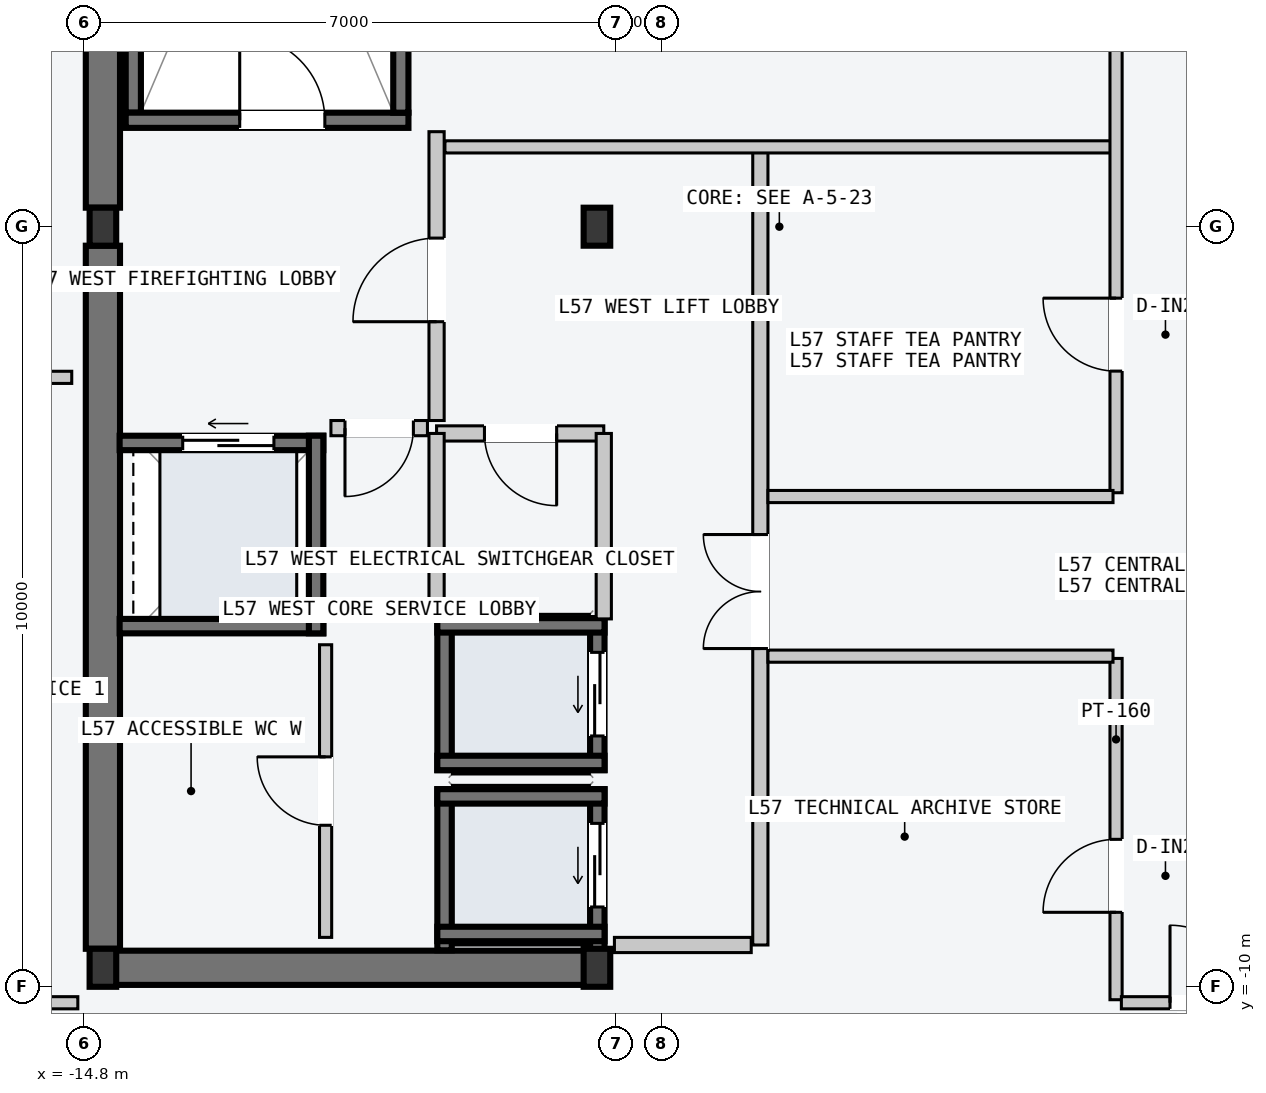
"""IFC4 building model, lengths in metres.
Left out: names, types, materials, properties, quantities, classifications, styles, units other than length and angle.
Written with IfcOpenShell. Run it as: python <this file> out.ifc"""

import sys

from ifc_helpers import new_model, si_unit, direction, frame, frame_2d, origin, origin_2d, place, context, subcontext, project, spatial, rectangle, i_section, extrude, element, fill, save


model = new_model("IFC4")
c1 = context("Model", 3, precision=1e-05, world=origin(), true_north=direction((0.0, 1.0)))
c2 = subcontext(c1, "Body", "Model", "MODEL_VIEW")
j1 = project(units=[si_unit("LENGTHUNIT", "METRE"), si_unit("PLANEANGLEUNIT", "RADIAN")], contexts=[c1])
p1 = place(None, origin())
s1 = spatial("IfcSite", under=j1, at=p1, CompositionType="ELEMENT")
p2 = place(p1, origin())
s2 = spatial("IfcBuilding", under=s1, at=p2, CompositionType="ELEMENT")
p3 = place(p2, frame((0.0, 0.0, 218.4)))
s3 = spatial("IfcBuildingStorey", under=s2, at=p3, CompositionType="ELEMENT", Elevation=218.4)
p4 = place(p3, frame((-14.53, -9.75, -0.2), z_axis=(0.0, 0.0, 1.0), x_axis=(1.0, 0.0, 0.0)))
e1 = element("IfcWall", 1, at=p4, inside=s3, PredefinedType="SHEAR", context=c2, shape_type="SweptSolid", body=[
    extrude(rectangle(XDim=6.46, YDim=0.45, at=frame_2d((3.23, 0.0))), origin(), (0.0, 0.0, 1.0), 3.6),
])
for number, where, z_axis, x_axis in (
    (2, (-14.55, -9.5, -0.2), (0.0, 0.0, 1.0), (0.0, 1.0, 0.0)),
    (3, (-14.55, 0.25, -0.2), (0.0, 0.0, 1.0), (0.0, 1.0, 0.0)),
):
    element("IfcWall", number, at=place(p3, frame(where, z_axis=z_axis, x_axis=x_axis)), inside=s3, PredefinedType="SHEAR", context=c2, shape_type="SweptSolid", body=[
        extrude(rectangle(XDim=9.25, YDim=0.45, at=frame_2d((4.625, 0.0))), origin(), (0.0, 0.0, 1.0), 3.6),
    ])
p5 = place(p3, frame((-14.15, 1.5, -0.2), z_axis=(0.0, 0.0, 1.0), x_axis=(0.0, 1.0, 0.0)))
e4 = element("IfcWall", 4, at=p5, inside=s3, PredefinedType="SOLIDWALL", context=c2, shape_type="SweptSolid", body=[
    extrude(rectangle(XDim=7.8, YDim=0.2, at=frame_2d((3.9, 0.0))), origin(), (0.0, 0.0, 1.0), 3.6),
])
p6 = place(p3, frame((-14.25, 1.4, -0.2), z_axis=(0.0, 0.0, 1.0), x_axis=(1.0, 0.0, 0.0)))
e5 = element("IfcWall", 5, at=p6, inside=s3, PredefinedType="SOLIDWALL", context=c2, shape_type="SweptSolid", body=[
    extrude(rectangle(XDim=3.72, YDim=0.2, at=frame_2d((1.86, 0.0))), origin(), (0.0, 0.0, 1.0), 3.6),
])
p7 = place(p6, frame((1.5, 0.0, 0.2)))
e6 = element("IfcOpeningElement", 6, at=p7, cuts=e5, PredefinedType="OPENING", context=c2, shape_type="SweptSolid", body=[
    extrude(rectangle(XDim=1.12, YDim=2.18, at=frame_2d((0.56, 1.09))), frame((0.0, 0.11, 0.0), z_axis=(0.0, -1.0, 0.0), x_axis=(1.0, 0.0, 0.0)), (0.0, 0.0, 1.0), 0.22),
])
p8 = place(p3, frame((-10.63, 1.5, -0.2), z_axis=(0.0, 0.0, 1.0), x_axis=(0.0, 1.0, 0.0)))
e7 = element("IfcWall", 7, at=p8, inside=s3, PredefinedType="SOLIDWALL", context=c2, shape_type="SweptSolid", body=[
    extrude(rectangle(XDim=7.8, YDim=0.2, at=frame_2d((3.9, 0.0))), origin(), (0.0, 0.0, 1.0), 3.6),
])
for number, where, z_axis, x_axis in (
    (8, (-14.55, -9.75, 0.0), (0.0, 0.0, 1.0), (1.0, 0.0, 0.0)),
    (9, (-14.55, 0.0, 0.0), (0.0, 0.0, 1.0), (1.0, 0.0, 0.0)),
    (10, (-8.05, -9.75, 0.0), (0.0, 0.0, 1.0), (1.0, 0.0, 0.0)),
    (11, (-8.05, 0.0, 0.0), (0.0, 0.0, 1.0), (1.0, 0.0, 0.0)),
):
    element("IfcColumn", number, at=place(p3, frame(where, z_axis=z_axis, x_axis=x_axis)), inside=s3, PredefinedType="COLUMN", context=c2, shape_type="SweptSolid", body=[
        extrude(i_section(OverallWidth=0.35, OverallDepth=0.5, WebThickness=0.02, FlangeThickness=0.032, at=origin_2d()), origin(), (0.0, 0.0, 1.0), 3.6),
    ])
p9 = place(p3, frame((-8.045, -9.52, -0.2), z_axis=(0.0, 0.0, 1.0), x_axis=(0.0, 1.0, 0.0)))
e12 = element("IfcWall", 12, at=p9, inside=s3, PredefinedType="SOLIDWALL", context=c2, shape_type="SweptSolid", body=[
    extrude(rectangle(XDim=2.12, YDim=0.19, at=frame_2d((1.06, 0.0))), origin(), (0.0, 0.0, 1.0), 3.6),
])
p10 = place(p9, frame((0.57, 0.0, 0.2)))
e13 = element("IfcOpeningElement", 13, at=p10, cuts=e12, PredefinedType="OPENING", context=c2, shape_type="SweptSolid", body=[
    extrude(rectangle(XDim=1.1, YDim=2.2, at=frame_2d((0.55, 1.1))), frame((0.0, 0.105, 0.0), z_axis=(0.0, -1.0, 0.0), x_axis=(1.0, 0.0, 0.0)), (0.0, 0.0, 1.0), 0.21),
])
p11 = place(p3, frame((-10.055, -9.52, -0.2), z_axis=(0.0, 0.0, 1.0), x_axis=(0.0, 1.0, 0.0)))
e14 = element("IfcWall", 14, at=p11, inside=s3, PredefinedType="SOLIDWALL", context=c2, shape_type="SweptSolid", body=[
    extrude(rectangle(XDim=2.12, YDim=0.19, at=frame_2d((1.06, 0.0))), origin(), (0.0, 0.0, 1.0), 3.6),
])
for number, where, z_axis, x_axis in (
    (15, (-10.15, -7.495, -0.2), (0.0, 0.0, 1.0), (1.0, 0.0, 0.0)),
    (16, (-10.15, -9.305, -0.2), (0.0, 0.0, 1.0), (1.0, 0.0, 0.0)),
):
    element("IfcWall", number, at=place(p3, frame(where, z_axis=z_axis, x_axis=x_axis)), inside=s3, PredefinedType="SOLIDWALL", context=c2, shape_type="SweptSolid", body=[
        extrude(rectangle(XDim=2.2, YDim=0.19, at=frame_2d((1.1, 0.0))), origin(), (0.0, 0.0, 1.0), 3.6),
    ])
p12 = place(p3, frame((-8.045, -7.15, -0.2), z_axis=(0.0, 0.0, 1.0), x_axis=(0.0, 1.0, 0.0)))
e17 = element("IfcWall", 17, at=p12, inside=s3, PredefinedType="SOLIDWALL", context=c2, shape_type="SweptSolid", body=[
    extrude(rectangle(XDim=2.0, YDim=0.19, at=frame_2d((1.0, 0.0))), origin(), (0.0, 0.0, 1.0), 3.6),
])
p13 = place(p12, frame((0.45, 0.0, 0.2)))
e18 = element("IfcOpeningElement", 18, at=p13, cuts=e17, PredefinedType="OPENING", context=c2, shape_type="SweptSolid", body=[
    extrude(rectangle(XDim=1.1, YDim=2.2, at=frame_2d((0.55, 1.1))), frame((0.0, 0.105, 0.0), z_axis=(0.0, -1.0, 0.0), x_axis=(1.0, 0.0, 0.0)), (0.0, 0.0, 1.0), 0.21),
])
p14 = place(p3, frame((-10.055, -7.15, -0.2), z_axis=(0.0, 0.0, 1.0), x_axis=(0.0, 1.0, 0.0)))
e19 = element("IfcWall", 19, at=p14, inside=s3, PredefinedType="SOLIDWALL", context=c2, shape_type="SweptSolid", body=[
    extrude(rectangle(XDim=2.0, YDim=0.19, at=frame_2d((1.0, 0.0))), origin(), (0.0, 0.0, 1.0), 3.6),
])
for number, where, z_axis, x_axis in (
    (20, (-10.15, -5.245, -0.2), (0.0, 0.0, 1.0), (1.0, 0.0, 0.0)),
    (21, (-10.15, -7.055, -0.2), (0.0, 0.0, 1.0), (1.0, 0.0, 0.0)),
):
    element("IfcWall", number, at=place(p3, frame(where, z_axis=z_axis, x_axis=x_axis)), inside=s3, PredefinedType="SOLIDWALL", context=c2, shape_type="SweptSolid", body=[
        extrude(rectangle(XDim=2.2, YDim=0.19, at=frame_2d((1.1, 0.0))), origin(), (0.0, 0.0, 1.0), 3.6),
    ])
p15 = place(p3, frame((-14.33, -2.845, -0.2), z_axis=(0.0, 0.0, 1.0), x_axis=(1.0, 0.0, 0.0)))
e22 = element("IfcWall", 22, at=p15, inside=s3, PredefinedType="SOLIDWALL", context=c2, shape_type="SweptSolid", body=[
    extrude(rectangle(XDim=2.68, YDim=0.19, at=frame_2d((1.34, 0.0))), origin(), (0.0, 0.0, 1.0), 3.6),
])
p16 = place(p15, frame((0.83, 0.0, 0.2)))
e23 = element("IfcOpeningElement", 23, at=p16, cuts=e22, PredefinedType="OPENING", context=c2, shape_type="SweptSolid", body=[
    extrude(rectangle(XDim=1.2, YDim=2.2, at=frame_2d((0.6, 1.1))), frame((0.0, 0.105, 0.0), z_axis=(0.0, -1.0, 0.0), x_axis=(1.0, 0.0, 0.0)), (0.0, 0.0, 1.0), 0.21),
])
p17 = place(p3, frame((-14.33, -5.255, -0.2), z_axis=(0.0, 0.0, 1.0), x_axis=(1.0, 0.0, 0.0)))
e24 = element("IfcWall", 24, at=p17, inside=s3, PredefinedType="SOLIDWALL", context=c2, shape_type="SweptSolid", body=[
    extrude(rectangle(XDim=2.68, YDim=0.19, at=frame_2d((1.34, 0.0))), origin(), (0.0, 0.0, 1.0), 3.6),
])
p18 = place(p3, frame((-11.745, -5.35, -0.2), z_axis=(0.0, 0.0, 1.0), x_axis=(0.0, 1.0, 0.0)))
e25 = element("IfcWall", 25, at=p18, inside=s3, PredefinedType="SOLIDWALL", context=c2, shape_type="SweptSolid", body=[
    extrude(rectangle(XDim=2.6, YDim=0.19, at=frame_2d((1.3, 0.0))), origin(), (0.0, 0.0, 1.0), 3.6),
])
p19 = place(p3, frame((-5.9, -9.45, 0.0), z_axis=(0.0, 0.0, 1.0), x_axis=(0.0, 1.0, 0.0)))
e26 = element("IfcWall", 26, at=p19, inside=s3, PredefinedType="PARTITIONING", context=c2, shape_type="SweptSolid", body=[
    extrude(rectangle(XDim=10.5, YDim=0.2, at=frame_2d((5.25, 0.0))), origin(), (0.0, 0.0, 1.0), 3.4),
])
p20 = place(p19, frame((3.9, 0.0, 0.0)))
e27 = element("IfcOpeningElement", 27, at=p20, cuts=e26, PredefinedType="OPENING", context=c2, shape_type="SweptSolid", body=[
    extrude(rectangle(XDim=1.5, YDim=2.2, at=frame_2d((0.75, 1.1))), frame((0.0, 0.11, 0.0), z_axis=(0.0, -1.0, 0.0), x_axis=(1.0, 0.0, 0.0)), (0.0, 0.0, 1.0), 0.22),
])
p21 = place(p3, frame((-6.02, -9.45, 0.0), z_axis=(0.0, 0.0, 1.0), x_axis=(-1.0, 0.0, 0.0)))
e28 = element("IfcWall", 28, at=p21, inside=s3, PredefinedType="PARTITIONING", context=c2, shape_type="SweptSolid", body=[
    extrude(rectangle(XDim=1.8, YDim=0.2, at=frame_2d((0.9, 0.0))), origin(), (0.0, 0.0, 1.0), 3.4),
])
p22 = place(p3, frame((-10.16, -2.55, 0.0), z_axis=(0.0, 0.0, 1.0), x_axis=(0.0, 1.0, 0.0)))
e29 = element("IfcWall", 29, at=p22, inside=s3, PredefinedType="PARTITIONING", context=c2, shape_type="SweptSolid", body=[
    extrude(rectangle(XDim=3.8, YDim=0.2, at=frame_2d((1.9, 0.0))), origin(), (0.0, 0.0, 1.0), 3.4),
])
p23 = place(p22, frame((1.3, 0.0, 0.0)))
e30 = element("IfcOpeningElement", 30, at=p23, cuts=e29, PredefinedType="OPENING", context=c2, shape_type="SweptSolid", body=[
    extrude(rectangle(XDim=1.1, YDim=2.15, at=frame_2d((0.55, 1.075))), frame((0.0, 0.11, 0.0), z_axis=(0.0, -1.0, 0.0), x_axis=(1.0, 0.0, 0.0)), (0.0, 0.0, 1.0), 0.22),
])
p24 = place(p3, frame((-10.28, -2.65, 0.0), z_axis=(0.0, 0.0, 1.0), x_axis=(-1.0, 0.0, 0.0)))
e31 = element("IfcWall", 31, at=p24, inside=s3, PredefinedType="PARTITIONING", context=c2, shape_type="SweptSolid", body=[
    extrude(rectangle(XDim=1.27, YDim=0.2, at=frame_2d((0.635, 0.0))), origin(), (0.0, 0.0, 1.0), 3.4),
])
p25 = place(p24, frame((0.185, 0.0, 0.0)))
e32 = element("IfcOpeningElement", 32, at=p25, cuts=e31, PredefinedType="OPENING", context=c2, shape_type="SweptSolid", body=[
    extrude(rectangle(XDim=0.9, YDim=2.15, at=frame_2d((0.45, 1.075))), frame((0.0, 0.11, 0.0), z_axis=(0.0, -1.0, 0.0), x_axis=(1.0, 0.0, 0.0)), (0.0, 0.0, 1.0), 0.22),
])
p26 = place(p3, frame((-7.96, -2.72, 0.0), z_axis=(0.0, 0.0, 1.0), x_axis=(-1.0, 0.0, 0.0)))
e33 = element("IfcWall", 33, at=p26, inside=s3, PredefinedType="PARTITIONING", context=c2, shape_type="SweptSolid", body=[
    extrude(rectangle(XDim=2.2, YDim=0.2, at=frame_2d((1.1, 0.0))), origin(), (0.0, 0.0, 1.0), 3.4),
])
p27 = place(p26, frame((0.62, 0.0, 0.0)))
e34 = element("IfcOpeningElement", 34, at=p27, cuts=e33, PredefinedType="OPENING", context=c2, shape_type="SweptSolid", body=[
    extrude(rectangle(XDim=0.95, YDim=2.1, at=frame_2d((0.475, 1.05))), frame((0.0, 0.11, 0.0), z_axis=(0.0, -1.0, 0.0), x_axis=(1.0, 0.0, 0.0)), (0.0, 0.0, 1.0), 0.22),
])
for number, where, z_axis, x_axis in (
    (35, (-7.96, -5.16, 0.0), (0.0, 0.0, 1.0), (0.0, 1.0, 0.0)),
    (36, (-10.16, -5.16, 0.0), (0.0, 0.0, 1.0), (0.0, 1.0, 0.0)),
):
    element("IfcWall", number, at=place(p3, frame(where, z_axis=z_axis, x_axis=x_axis)), inside=s3, PredefinedType="PARTITIONING", context=c2, shape_type="SweptSolid", body=[
        extrude(rectangle(XDim=2.44, YDim=0.2, at=frame_2d((1.22, 0.0))), origin(), (0.0, 0.0, 1.0), 3.4),
    ])
p28 = place(p3, frame((-11.62, -9.35, 0.0), z_axis=(0.0, 0.0, 1.0), x_axis=(0.0, 1.0, 0.0)))
e37 = element("IfcWall", 37, at=p28, inside=s3, PredefinedType="PARTITIONING", context=c2, shape_type="SweptSolid", body=[
    extrude(rectangle(XDim=3.85, YDim=0.16, at=frame_2d((1.925, 0.0))), origin(), (0.0, 0.0, 1.0), 3.4),
])
p29 = place(p28, frame((1.475, 0.0, 0.0)))
e38 = element("IfcOpeningElement", 38, at=p29, cuts=e37, PredefinedType="OPENING", context=c2, shape_type="SweptSolid", body=[
    extrude(rectangle(XDim=0.9, YDim=2.15, at=frame_2d((0.45, 1.075))), frame((0.0, 0.09, 0.0), z_axis=(0.0, -1.0, 0.0), x_axis=(1.0, 0.0, 0.0)), (0.0, 0.0, 1.0), 0.18),
])
p30 = place(p3, frame((-10.05, 1.05, 0.0), z_axis=(0.0, 0.0, 1.0), x_axis=(1.0, 0.0, 0.0)))
e39 = element("IfcWall", 39, at=p30, inside=s3, PredefinedType="PARTITIONING", context=c2, shape_type="SweptSolid", body=[
    extrude(rectangle(XDim=8.79, YDim=0.16, at=frame_2d((4.395, 0.0))), origin(), (0.0, 0.0, 1.0), 3.4),
])
p31 = place(p3, frame((-1.22, -3.5, 0.0), z_axis=(0.0, 0.0, 1.0), x_axis=(0.0, 1.0, 0.0)))
e40 = element("IfcWall", 40, at=p31, inside=s3, PredefinedType="PARTITIONING", context=c2, shape_type="SweptSolid", body=[
    extrude(rectangle(XDim=12.81, YDim=0.16, at=frame_2d((6.405, 0.0))), origin(), (0.0, 0.0, 1.0), 3.4),
])
p32 = place(p31, frame((6.1, 0.0, 0.0)))
e41 = element("IfcOpeningElement", 41, at=p32, cuts=e40, PredefinedType="OPENING", context=c2, shape_type="SweptSolid", body=[
    extrude(rectangle(XDim=1.24, YDim=2.24, at=frame_2d((0.62, 1.12))), frame((0.0, 0.09, 0.0), z_axis=(0.0, -1.0, 0.0), x_axis=(1.0, 0.0, 0.0)), (0.0, 0.0, 1.0), 0.18),
])
p33 = place(p31, frame((1.6, 0.0, 0.0)))
e42 = element("IfcOpeningElement", 42, at=p33, cuts=e40, PredefinedType="OPENING", context=c2, shape_type="SweptSolid", body=[
    extrude(rectangle(XDim=0.96, YDim=2.18, at=frame_2d((0.48, 1.09))), frame((0.0, 0.09, 0.0), z_axis=(0.0, -1.0, 0.0), x_axis=(1.0, 0.0, 0.0)), (0.0, 0.0, 1.0), 0.18),
])
p34 = place(p3, frame((-5.8, -3.55, 0.0), z_axis=(0.0, 0.0, 1.0), x_axis=(1.0, 0.0, 0.0)))
e43 = element("IfcWall", 43, at=p34, inside=s3, PredefinedType="PARTITIONING", context=c2, shape_type="SweptSolid", body=[
    extrude(rectangle(XDim=4.54, YDim=0.16, at=frame_2d((2.27, 0.0))), origin(), (0.0, 0.0, 1.0), 3.4),
])
p35 = place(p3, frame((-1.22, -10.17, 0.0), z_axis=(0.0, 0.0, 1.0), x_axis=(0.0, 1.0, 0.0)))
e44 = element("IfcWall", 44, at=p35, inside=s3, PredefinedType="PARTITIONING", context=c2, shape_type="SweptSolid", body=[
    extrude(rectangle(XDim=4.49, YDim=0.16, at=frame_2d((2.245, 0.0))), origin(), (0.0, 0.0, 1.0), 3.4),
])
p36 = place(p35, frame((1.15, 0.0, 0.0)))
e45 = element("IfcOpeningElement", 45, at=p36, cuts=e44, PredefinedType="OPENING", context=c2, shape_type="SweptSolid", body=[
    extrude(rectangle(XDim=0.96, YDim=2.18, at=frame_2d((0.48, 1.09))), frame((0.0, 0.09, 0.0), z_axis=(0.0, -1.0, 0.0), x_axis=(1.0, 0.0, 0.0)), (0.0, 0.0, 1.0), 0.18),
])
p37 = place(p3, frame((-5.8, -5.65, 0.0), z_axis=(0.0, 0.0, 1.0), x_axis=(1.0, 0.0, 0.0)))
e46 = element("IfcWall", 46, at=p37, inside=s3, PredefinedType="PARTITIONING", context=c2, shape_type="SweptSolid", body=[
    extrude(rectangle(XDim=4.54, YDim=0.16, at=frame_2d((2.27, 0.0))), origin(), (0.0, 0.0, 1.0), 3.4),
])
p38 = place(p3, frame((-1.15, -10.21, 0.0), z_axis=(0.0, 0.0, 1.0), x_axis=(1.0, 0.0, 0.0)))
e47 = element("IfcWall", 47, at=p38, inside=s3, PredefinedType="PARTITIONING", context=c2, shape_type="SweptSolid", body=[
    extrude(rectangle(XDim=2.3, YDim=0.16, at=frame_2d((1.15, 0.0))), origin(), (0.0, 0.0, 1.0), 3.4),
])
p39 = place(p38, frame((0.64, 0.0, 0.0)))
e48 = element("IfcOpeningElement", 48, at=p39, cuts=e47, PredefinedType="OPENING", context=c2, shape_type="SweptSolid", body=[
    extrude(rectangle(XDim=1.02, YDim=2.2, at=frame_2d((0.51, 1.1))), frame((0.0, 0.09, 0.0), z_axis=(0.0, -1.0, 0.0), x_axis=(1.0, 0.0, 0.0)), (0.0, 0.0, 1.0), 0.18),
])
p40 = place(p3, frame((-18.56, -10.21, 0.0), z_axis=(0.0, 0.0, 1.0), x_axis=(1.0, 0.0, 0.0)))
e49 = element("IfcWall", 49, at=p40, inside=s3, PredefinedType="PARTITIONING", context=c2, shape_type="SweptSolid", body=[
    extrude(rectangle(XDim=3.68, YDim=0.16, at=frame_2d((1.84, 0.0))), origin(), (0.0, 0.0, 1.0), 3.4),
])
p41 = place(p40, frame((1.36, 0.0, 0.0)))
e50 = element("IfcOpeningElement", 50, at=p41, cuts=e49, PredefinedType="OPENING", context=c2, shape_type="SweptSolid", body=[
    extrude(rectangle(XDim=0.96, YDim=2.18, at=frame_2d((0.48, 1.09))), frame((0.0, 0.09, 0.0), z_axis=(0.0, -1.0, 0.0), x_axis=(1.0, 0.0, 0.0)), (0.0, 0.0, 1.0), 0.18),
])
p42 = place(p3, frame((-18.56, -1.982, 0.0), z_axis=(0.0, 0.0, 1.0), x_axis=(1.0, 0.0, 0.0)))
e51 = element("IfcWall", 51, at=p42, inside=s3, PredefinedType="PARTITIONING", context=c2, shape_type="SweptSolid", body=[
    extrude(rectangle(XDim=3.6, YDim=0.16, at=frame_2d((1.8, 0.0))), origin(), (0.0, 0.0, 1.0), 3.4),
])
p43 = place(p42, frame((0.9, 0.0, 0.0)))
e52 = element("IfcOpeningElement", 52, at=p43, cuts=e51, PredefinedType="OPENING", context=c2, shape_type="SweptSolid", body=[
    extrude(rectangle(XDim=0.96, YDim=2.18, at=frame_2d((0.48, 1.09))), frame((0.0, 0.09, 0.0), z_axis=(0.0, -1.0, 0.0), x_axis=(1.0, 0.0, 0.0)), (0.0, 0.0, 1.0), 0.18),
])
p44 = place(p7, origin())
e53 = element("IfcDoor", 53, at=p44, inside=s3, OperationType="SINGLE_SWING_LEFT", PredefinedType="DOOR", context=c2, shape_type="SweptSolid", body=[
    extrude(rectangle(XDim=1.12, YDim=2.18, at=frame_2d((0.56, 1.09))), frame((0.0, 0.025, 0.0), z_axis=(0.0, -1.0, 0.0), x_axis=(1.0, 0.0, 0.0)), (0.0, 0.0, 1.0), 0.05),
])
fill(e6, e53)
p45 = place(p10, origin())
e54 = element("IfcDoor", 54, at=p45, inside=s3, OperationType="SLIDING_TO_LEFT", PredefinedType="DOOR", context=c2, shape_type="SweptSolid", body=[
    extrude(rectangle(XDim=1.1, YDim=2.2, at=frame_2d((0.55, 1.1))), frame((0.0, 0.025, 0.0), z_axis=(0.0, -1.0, 0.0), x_axis=(1.0, 0.0, 0.0)), (0.0, 0.0, 1.0), 0.05),
])
fill(e13, e54)
p46 = place(p13, origin())
e55 = element("IfcDoor", 55, at=p46, inside=s3, OperationType="SLIDING_TO_LEFT", PredefinedType="DOOR", context=c2, shape_type="SweptSolid", body=[
    extrude(rectangle(XDim=1.1, YDim=2.2, at=frame_2d((0.55, 1.1))), frame((0.0, 0.025, 0.0), z_axis=(0.0, -1.0, 0.0), x_axis=(1.0, 0.0, 0.0)), (0.0, 0.0, 1.0), 0.05),
])
fill(e18, e55)
p47 = place(p16, origin())
e56 = element("IfcDoor", 56, at=p47, inside=s3, OperationType="SLIDING_TO_LEFT", PredefinedType="DOOR", context=c2, shape_type="SweptSolid", body=[
    extrude(rectangle(XDim=1.2, YDim=2.2, at=frame_2d((0.6, 1.1))), frame((0.0, 0.025, 0.0), z_axis=(0.0, -1.0, 0.0), x_axis=(1.0, 0.0, 0.0)), (0.0, 0.0, 1.0), 0.05),
])
fill(e23, e56)
p48 = place(p20, origin())
e57 = element("IfcDoor", 57, at=p48, inside=s3, OperationType="DOUBLE_DOOR_SINGLE_SWING", PredefinedType="DOOR", context=c2, shape_type="SweptSolid", body=[
    extrude(rectangle(XDim=1.5, YDim=2.2, at=frame_2d((0.75, 1.1))), frame((0.0, 0.025, 0.0), z_axis=(0.0, -1.0, 0.0), x_axis=(1.0, 0.0, 0.0)), (0.0, 0.0, 1.0), 0.05),
])
fill(e27, e57)
p49 = place(p23, origin())
e58 = element("IfcDoor", 58, at=p49, inside=s3, OperationType="SINGLE_SWING_LEFT", PredefinedType="DOOR", context=c2, shape_type="SweptSolid", body=[
    extrude(rectangle(XDim=1.1, YDim=2.15, at=frame_2d((0.55, 1.075))), frame((0.0, 0.025, 0.0), z_axis=(0.0, -1.0, 0.0), x_axis=(1.0, 0.0, 0.0)), (0.0, 0.0, 1.0), 0.05),
])
fill(e30, e58)
p50 = place(p25, origin())
e59 = element("IfcDoor", 59, at=p50, inside=s3, OperationType="SINGLE_SWING_RIGHT", PredefinedType="DOOR", context=c2, shape_type="SweptSolid", body=[
    extrude(rectangle(XDim=0.9, YDim=2.15, at=frame_2d((0.45, 1.075))), frame((0.0, 0.025, 0.0), z_axis=(0.0, -1.0, 0.0), x_axis=(1.0, 0.0, 0.0)), (0.0, 0.0, 1.0), 0.05),
])
fill(e32, e59)
p51 = place(p27, origin())
e60 = element("IfcDoor", 60, at=p51, inside=s3, OperationType="SINGLE_SWING_LEFT", PredefinedType="DOOR", context=c2, shape_type="SweptSolid", body=[
    extrude(rectangle(XDim=0.95, YDim=2.1, at=frame_2d((0.475, 1.05))), frame((0.0, 0.025, 0.0), z_axis=(0.0, -1.0, 0.0), x_axis=(1.0, 0.0, 0.0)), (0.0, 0.0, 1.0), 0.05),
])
fill(e34, e60)
p52 = place(p29, origin())
e61 = element("IfcDoor", 61, at=p52, inside=s3, OperationType="SINGLE_SWING_RIGHT", PredefinedType="DOOR", context=c2, shape_type="SweptSolid", body=[
    extrude(rectangle(XDim=0.9, YDim=2.15, at=frame_2d((0.45, 1.075))), frame((0.0, 0.025, 0.0), z_axis=(0.0, -1.0, 0.0), x_axis=(1.0, 0.0, 0.0)), (0.0, 0.0, 1.0), 0.05),
])
fill(e38, e61)
p53 = place(p33, origin())
e62 = element("IfcDoor", 62, at=p53, inside=s3, OperationType="SINGLE_SWING_RIGHT", PredefinedType="DOOR", context=c2, shape_type="SweptSolid", body=[
    extrude(rectangle(XDim=0.96, YDim=2.18, at=frame_2d((0.48, 1.09))), frame((0.0, 0.025, 0.0), z_axis=(0.0, -1.0, 0.0), x_axis=(1.0, 0.0, 0.0)), (0.0, 0.0, 1.0), 0.05),
])
fill(e42, e62)
p54 = place(p36, origin())
e63 = element("IfcDoor", 63, at=p54, inside=s3, OperationType="SINGLE_SWING_LEFT", PredefinedType="DOOR", context=c2, shape_type="SweptSolid", body=[
    extrude(rectangle(XDim=0.96, YDim=2.18, at=frame_2d((0.48, 1.09))), frame((0.0, 0.025, 0.0), z_axis=(0.0, -1.0, 0.0), x_axis=(1.0, 0.0, 0.0)), (0.0, 0.0, 1.0), 0.05),
])
fill(e45, e63)
p55 = place(p39, origin())
e64 = element("IfcDoor", 64, at=p55, inside=s3, OperationType="SINGLE_SWING_LEFT", PredefinedType="DOOR", context=c2, shape_type="SweptSolid", body=[
    extrude(rectangle(XDim=1.02, YDim=2.2, at=frame_2d((0.51, 1.1))), frame((0.0, 0.025, 0.0), z_axis=(0.0, -1.0, 0.0), x_axis=(1.0, 0.0, 0.0)), (0.0, 0.0, 1.0), 0.05),
])
fill(e48, e64)
save(model, sys.argv[1])
